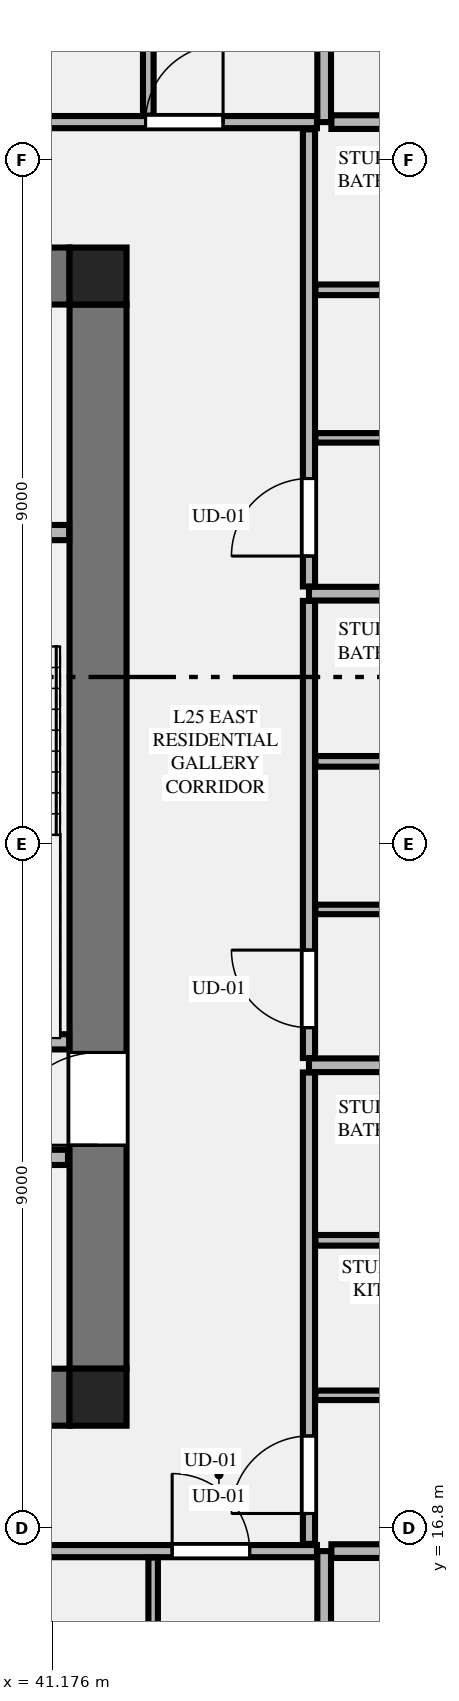
"""IFC4 building model, lengths in metres.
Left out: names, types, materials, properties, quantities, classifications, styles, units other than length and angle.
Written with IfcOpenShell. Run it as: python <this file> out.ifc"""

import sys

from ifc_helpers import new_model, si_unit, direction, frame, frame_2d, origin, origin_2d, place, context, subcontext, project, spatial, rectangle, extrude, element, fill, save


model = new_model("IFC4")
c1 = context("Model", 3, precision=1e-05, world=origin(), true_north=direction((0.0, 1.0)))
c2 = subcontext(c1, "Body", "Model", "MODEL_VIEW")
j1 = project(units=[si_unit("LENGTHUNIT", "METRE"), si_unit("PLANEANGLEUNIT", "RADIAN")], contexts=[c1])
p1 = place(None, origin())
s1 = spatial("IfcSite", under=j1, at=p1, CompositionType="ELEMENT")
p2 = place(p1, origin())
s2 = spatial("IfcBuilding", under=s1, at=p2, CompositionType="ELEMENT")
p3 = place(p2, frame((0.0, 0.0, 98.4)))
s3 = spatial("IfcBuildingStorey", under=s2, at=p3, CompositionType="ELEMENT", Elevation=98.4)
for number, where, z_axis, x_axis in (
    (1, (41.775, 18.525, 0.0), (0.0, 0.0, 1.0), (1.0, 0.0, 0.0)),
    (2, (41.775, 33.275, 0.0), (0.0, 0.0, 1.0), (1.0, 0.0, 0.0)),
):
    element("IfcColumn", number, at=place(p3, frame(where, z_axis=z_axis, x_axis=x_axis)), inside=s3, PredefinedType="COLUMN", context=c2, shape_type="SweptSolid", body=[
        extrude(rectangle(XDim=0.75, YDim=0.75, at=origin_2d()), origin(), (0.0, 0.0, 1.0), 3.55),
    ])
for number, where, z_axis, x_axis in (
    (3, (23.4, 18.525, 0.0), (0.0, 0.0, 1.0), (1.0, 0.0, 0.0)),
    (4, (23.4, 33.275, 0.0), (0.0, 0.0, 1.0), (1.0, 0.0, 0.0)),
):
    element("IfcWall", number, at=place(p3, frame(where, z_axis=z_axis, x_axis=x_axis)), inside=s3, PredefinedType="SHEAR", context=c2, shape_type="SweptSolid", body=[
        extrude(rectangle(XDim=18.0, YDim=0.75, at=frame_2d((9.0, 0.0))), origin(), (0.0, 0.0, 1.0), 3.34),
    ])
p4 = place(p3, frame((41.775, 18.9, 0.0), z_axis=(0.0, 0.0, 1.0), x_axis=(0.0, 1.0, 0.0)))
e5 = element("IfcWall", 5, at=p4, inside=s3, PredefinedType="SHEAR", context=c2, shape_type="SweptSolid", body=[
    extrude(rectangle(XDim=14.0, YDim=0.75, at=frame_2d((7.0, 0.0))), origin(), (0.0, 0.0, 1.0), 3.34),
])
p5 = place(p4, frame((2.94, 0.0, 0.0)))
e6 = element("IfcOpeningElement", 6, at=p5, cuts=e5, PredefinedType="OPENING", context=c2, shape_type="SweptSolid", body=[
    extrude(rectangle(XDim=1.22, YDim=2.25, at=frame_2d((0.61, 1.125))), frame((0.0, 0.385, 0.0), z_axis=(0.0, -1.0, 0.0), x_axis=(1.0, 0.0, 0.0)), (0.0, 0.0, 1.0), 0.77),
])
p6 = place(p3, frame((38.125, 23.2, 0.0), z_axis=(0.0, 0.0, 1.0), x_axis=(1.0, 0.0, 0.0)))
e7 = element("IfcWall", 7, at=p6, inside=s3, PredefinedType="PLUMBINGWALL", context=c2, shape_type="SweptSolid", body=[
    extrude(rectangle(XDim=3.27, YDim=0.2, at=frame_2d((1.635, 0.0))), origin(), (0.0, 0.0, 1.0), 3.34),
])
p7 = place(p3, frame((38.125, 29.9, 0.0), z_axis=(0.0, 0.0, 1.0), x_axis=(1.0, 0.0, 0.0)))
e8 = element("IfcWall", 8, at=p7, inside=s3, PredefinedType="PLUMBINGWALL", context=c2, shape_type="SweptSolid", body=[
    extrude(rectangle(XDim=3.27, YDim=0.2, at=frame_2d((1.635, 0.0))), origin(), (0.0, 0.0, 1.0), 3.34),
])
p8 = place(p7, frame((0.5, 0.0, 0.0)))
e9 = element("IfcOpeningElement", 9, at=p8, cuts=e8, PredefinedType="OPENING", context=c2, shape_type="SweptSolid", body=[
    extrude(rectangle(XDim=0.85, YDim=2.05, at=frame_2d((0.425, 1.025))), frame((0.0, 0.11, 0.0), z_axis=(0.0, -1.0, 0.0), x_axis=(1.0, 0.0, 0.0)), (0.0, 0.0, 1.0), 0.22),
])
p9 = place(p3, frame((23.42, 21.68, 0.0), z_axis=(0.0, 0.0, 1.0), x_axis=(1.0, 0.0, 0.0)))
e10 = element("IfcWall", 10, at=p9, inside=s3, PredefinedType="PLUMBINGWALL", context=c2, shape_type="SweptSolid", body=[
    extrude(rectangle(XDim=17.96, YDim=0.2, at=frame_2d((8.98, 0.0))), origin(), (0.0, 0.0, 1.0), 3.34),
])
p10 = place(p9, frame((11.6, 0.0, 0.0)))
e11 = element("IfcOpeningElement", 11, at=p10, cuts=e10, PredefinedType="OPENING", context=c2, shape_type="SweptSolid", body=[
    extrude(rectangle(XDim=1.1, YDim=2.2, at=frame_2d((0.55, 1.1))), frame((0.0, 0.11, 0.0), z_axis=(0.0, -1.0, 0.0), x_axis=(1.0, 0.0, 0.0)), (0.0, 0.0, 1.0), 0.22),
])
p11 = place(p9, frame((1.2, 0.0, 0.0)))
e12 = element("IfcOpeningElement", 12, at=p11, cuts=e10, PredefinedType="OPENING", context=c2, shape_type="SweptSolid", body=[
    extrude(rectangle(XDim=0.85, YDim=2.05, at=frame_2d((0.425, 1.025))), frame((0.0, 0.11, 0.0), z_axis=(0.0, -1.0, 0.0), x_axis=(1.0, 0.0, 0.0)), (0.0, 0.0, 1.0), 0.22),
])
p12 = place(p9, frame((13.55, 0.0, 0.0)))
e13 = element("IfcOpeningElement", 13, at=p12, cuts=e10, PredefinedType="OPENING", context=c2, shape_type="SweptSolid", body=[
    extrude(rectangle(XDim=0.85, YDim=2.05, at=frame_2d((0.425, 1.025))), frame((0.0, 0.11, 0.0), z_axis=(0.0, -1.0, 0.0), x_axis=(1.0, 0.0, 0.0)), (0.0, 0.0, 1.0), 0.22),
])
p13 = place(p9, frame((15.85, 0.0, 0.0)))
e14 = element("IfcOpeningElement", 14, at=p13, cuts=e10, PredefinedType="OPENING", context=c2, shape_type="SweptSolid", body=[
    extrude(rectangle(XDim=0.85, YDim=2.05, at=frame_2d((0.425, 1.025))), frame((0.0, 0.11, 0.0), z_axis=(0.0, -1.0, 0.0), x_axis=(1.0, 0.0, 0.0)), (0.0, 0.0, 1.0), 0.22),
])
p14 = place(p3, frame((44.75, 4.105, 0.0), z_axis=(0.0, 0.0, 1.0), x_axis=(0.0, 1.0, 0.0)))
e15 = element("IfcWall", 15, at=p14, inside=s3, PredefinedType="PARTITIONING", context=c2, shape_type="SweptSolid", body=[
    extrude(rectangle(XDim=12.395, YDim=0.18, at=frame_2d((6.198, 0.0))), origin(), (0.0, 0.0, 1.0), 3.34),
])
p15 = place(p3, frame((28.663, 16.5, 0.0), z_axis=(0.0, 0.0, 1.0), x_axis=(1.0, 0.0, 0.0)))
e16 = element("IfcWall", 16, at=p15, inside=s3, PredefinedType="PARTITIONING", context=c2, shape_type="SweptSolid", body=[
    extrude(rectangle(XDim=15.992, YDim=0.16, at=frame_2d((7.996, 0.0))), origin(), (0.0, 0.0, 1.0), 3.34),
])
p16 = place(p15, frame((14.087, 0.0, 0.0)))
e17 = element("IfcOpeningElement", 17, at=p16, cuts=e16, PredefinedType="OPENING", context=c2, shape_type="SweptSolid", body=[
    extrude(rectangle(XDim=1.02, YDim=2.25, at=frame_2d((0.51, 1.125))), frame((0.0, 0.09, 0.0), z_axis=(0.0, -1.0, 0.0), x_axis=(1.0, 0.0, 0.0)), (0.0, 0.0, 1.0), 0.18),
])
p17 = place(p3, frame((42.5, 13.01, 0.0), z_axis=(0.0, 0.0, 1.0), x_axis=(0.0, 1.0, 0.0)))
e18 = element("IfcWall", 18, at=p17, inside=s3, PredefinedType="PARTITIONING", context=c2, shape_type="SweptSolid", body=[
    extrude(rectangle(XDim=3.405, YDim=0.125, at=frame_2d((1.703, 0.0))), origin(), (0.0, 0.0, 1.0), 2.722),
])
p18 = place(p3, frame((44.75, 35.3, 0.0), z_axis=(0.0, 0.0, 1.0), x_axis=(0.0, 1.0, 0.0)))
e19 = element("IfcWall", 19, at=p18, inside=s3, PredefinedType="PARTITIONING", context=c2, shape_type="SweptSolid", body=[
    extrude(rectangle(XDim=12.195, YDim=0.18, at=frame_2d((6.098, 0.0))), origin(), (0.0, 0.0, 1.0), 3.34),
])
p19 = place(p3, frame((36.327, 35.3, 0.0), z_axis=(0.0, 0.0, 1.0), x_axis=(1.0, 0.0, 0.0)))
e20 = element("IfcWall", 20, at=p19, inside=s3, PredefinedType="PARTITIONING", context=c2, shape_type="SweptSolid", body=[
    extrude(rectangle(XDim=8.328, YDim=0.16, at=frame_2d((4.164, 0.0))), origin(), (0.0, 0.0, 1.0), 3.34),
])
p20 = place(p19, frame((6.073, 0.0, 0.0)))
e21 = element("IfcOpeningElement", 21, at=p20, cuts=e20, PredefinedType="OPENING", context=c2, shape_type="SweptSolid", body=[
    extrude(rectangle(XDim=1.02, YDim=2.25, at=frame_2d((0.51, 1.125))), frame((0.0, 0.09, 0.0), z_axis=(0.0, -1.0, 0.0), x_axis=(1.0, 0.0, 0.0)), (0.0, 0.0, 1.0), 0.18),
])
p21 = place(p3, frame((42.436, 35.385, 0.0), z_axis=(0.0, 0.0, 1.0), x_axis=(0.0, 1.0, 0.0)))
e22 = element("IfcWall", 22, at=p21, inside=s3, PredefinedType="PLUMBINGWALL", context=c2, shape_type="SweptSolid", body=[
    extrude(rectangle(XDim=3.59, YDim=0.14, at=frame_2d((1.795, 0.0))), origin(), (0.0, 0.0, 1.0), 2.722),
])
p22 = place(p3, frame((44.845, 16.5, 0.0), z_axis=(0.0, 0.0, 1.0), x_axis=(1.0, 0.0, 0.0)))
e23 = element("IfcWall", 23, at=p22, inside=s3, PredefinedType="PARTITIONING", context=c2, shape_type="SweptSolid", body=[
    extrude(rectangle(XDim=7.77, YDim=0.18, at=frame_2d((3.885, 0.0))), origin(), (0.0, 0.0, 1.0), 3.34),
])
p23 = place(p3, frame((44.845, 35.3, 0.0), z_axis=(0.0, 0.0, 1.0), x_axis=(1.0, 0.0, 0.0)))
e24 = element("IfcWall", 24, at=p23, inside=s3, PredefinedType="PARTITIONING", context=c2, shape_type="SweptSolid", body=[
    extrude(rectangle(XDim=7.669, YDim=0.18, at=frame_2d((3.834, 0.0))), origin(), (0.0, 0.0, 1.0), 3.34),
])
p24 = place(p3, frame((44.55, 16.595, 0.0), z_axis=(0.0, 0.0, 1.0), x_axis=(0.0, 1.0, 0.0)))
e25 = element("IfcWall", 25, at=p24, inside=s3, PredefinedType="PARTITIONING", context=c2, shape_type="SweptSolid", body=[
    extrude(rectangle(XDim=6.202, YDim=0.16, at=frame_2d((3.101, 0.0))), origin(), (0.0, 0.0, 1.0), 3.34),
])
p25 = place(p24, frame((0.4, 0.0, 0.0)))
e26 = element("IfcOpeningElement", 26, at=p25, cuts=e25, PredefinedType="OPENING", context=c2, shape_type="SweptSolid", body=[
    extrude(rectangle(XDim=1.02, YDim=2.25, at=frame_2d((0.51, 1.125))), frame((0.0, 0.09, 0.0), z_axis=(0.0, -1.0, 0.0), x_axis=(1.0, 0.0, 0.0)), (0.0, 0.0, 1.0), 0.18),
])
p26 = place(p3, frame((44.635, 18.55, 0.0), z_axis=(0.0, 0.0, 1.0), x_axis=(1.0, 0.0, 0.0)))
e27 = element("IfcWall", 27, at=p26, inside=s3, PredefinedType="PARTITIONING", context=c2, shape_type="SweptSolid", body=[
    extrude(rectangle(XDim=2.38, YDim=0.125, at=frame_2d((1.19, 0.0))), origin(), (0.0, 0.0, 1.0), 2.722),
])
p27 = place(p3, frame((44.635, 20.589, 0.0), z_axis=(0.0, 0.0, 1.0), x_axis=(1.0, 0.0, 0.0)))
e28 = element("IfcWall", 28, at=p27, inside=s3, PredefinedType="PLUMBINGWALL", context=c2, shape_type="SweptSolid", body=[
    extrude(rectangle(XDim=2.38, YDim=0.14, at=frame_2d((1.19, 0.0))), origin(), (0.0, 0.0, 1.0), 3.34),
])
p28 = place(p3, frame((44.55, 22.892, 0.0), z_axis=(0.0, 0.0, 1.0), x_axis=(1.0, 0.0, 0.0)))
e29 = element("IfcWall", 29, at=p28, inside=s3, PredefinedType="PARTITIONING", context=c2, shape_type="SweptSolid", body=[
    extrude(rectangle(XDim=11.299, YDim=0.18, at=frame_2d((5.649, 0.0))), origin(), (0.0, 0.0, 1.0), 3.34),
])
p29 = place(p3, frame((44.55, 22.987, 0.0), z_axis=(0.0, 0.0, 1.0), x_axis=(0.0, 1.0, 0.0)))
e30 = element("IfcWall", 30, at=p29, inside=s3, PredefinedType="PARTITIONING", context=c2, shape_type="SweptSolid", body=[
    extrude(rectangle(XDim=6.014, YDim=0.16, at=frame_2d((3.007, 0.0))), origin(), (0.0, 0.0, 1.0), 3.34),
])
p30 = place(p29, frame((0.4, 0.0, 0.0)))
e31 = element("IfcOpeningElement", 31, at=p30, cuts=e30, PredefinedType="OPENING", context=c2, shape_type="SweptSolid", body=[
    extrude(rectangle(XDim=1.02, YDim=2.25, at=frame_2d((0.51, 1.125))), frame((0.0, 0.09, 0.0), z_axis=(0.0, -1.0, 0.0), x_axis=(1.0, 0.0, 0.0)), (0.0, 0.0, 1.0), 0.18),
])
p31 = place(p3, frame((44.635, 24.942, 0.0), z_axis=(0.0, 0.0, 1.0), x_axis=(1.0, 0.0, 0.0)))
e32 = element("IfcWall", 32, at=p31, inside=s3, PredefinedType="PARTITIONING", context=c2, shape_type="SweptSolid", body=[
    extrude(rectangle(XDim=2.38, YDim=0.125, at=frame_2d((1.19, 0.0))), origin(), (0.0, 0.0, 1.0), 3.34),
])
p32 = place(p3, frame((44.635, 26.89, 0.0), z_axis=(0.0, 0.0, 1.0), x_axis=(1.0, 0.0, 0.0)))
e33 = element("IfcWall", 33, at=p32, inside=s3, PredefinedType="PLUMBINGWALL", context=c2, shape_type="SweptSolid", body=[
    extrude(rectangle(XDim=2.38, YDim=0.14, at=frame_2d((1.19, 0.0))), origin(), (0.0, 0.0, 1.0), 3.34),
])
p33 = place(p3, frame((44.55, 29.096, 0.0), z_axis=(0.0, 0.0, 1.0), x_axis=(1.0, 0.0, 0.0)))
e34 = element("IfcWall", 34, at=p33, inside=s3, PredefinedType="PARTITIONING", context=c2, shape_type="SweptSolid", body=[
    extrude(rectangle(XDim=11.103, YDim=0.18, at=frame_2d((5.552, 0.0))), origin(), (0.0, 0.0, 1.0), 3.34),
])
p34 = place(p3, frame((44.55, 29.191, 0.0), z_axis=(0.0, 0.0, 1.0), x_axis=(0.0, 1.0, 0.0)))
e35 = element("IfcWall", 35, at=p34, inside=s3, PredefinedType="PARTITIONING", context=c2, shape_type="SweptSolid", body=[
    extrude(rectangle(XDim=6.014, YDim=0.16, at=frame_2d((3.007, 0.0))), origin(), (0.0, 0.0, 1.0), 3.34),
])
p35 = place(p34, frame((0.4, 0.0, 0.0)))
e36 = element("IfcOpeningElement", 36, at=p35, cuts=e35, PredefinedType="OPENING", context=c2, shape_type="SweptSolid", body=[
    extrude(rectangle(XDim=1.02, YDim=2.25, at=frame_2d((0.51, 1.125))), frame((0.0, 0.09, 0.0), z_axis=(0.0, -1.0, 0.0), x_axis=(1.0, 0.0, 0.0)), (0.0, 0.0, 1.0), 0.18),
])
p36 = place(p3, frame((44.635, 31.146, 0.0), z_axis=(0.0, 0.0, 1.0), x_axis=(1.0, 0.0, 0.0)))
e37 = element("IfcWall", 37, at=p36, inside=s3, PredefinedType="PARTITIONING", context=c2, shape_type="SweptSolid", body=[
    extrude(rectangle(XDim=2.38, YDim=0.125, at=frame_2d((1.19, 0.0))), origin(), (0.0, 0.0, 1.0), 3.34),
])
p37 = place(p3, frame((44.635, 33.094, 0.0), z_axis=(0.0, 0.0, 1.0), x_axis=(1.0, 0.0, 0.0)))
e38 = element("IfcWall", 38, at=p37, inside=s3, PredefinedType="PLUMBINGWALL", context=c2, shape_type="SweptSolid", body=[
    extrude(rectangle(XDim=2.38, YDim=0.14, at=frame_2d((1.19, 0.0))), origin(), (0.0, 0.0, 1.0), 3.34),
])
p38 = place(p5, origin())
e39 = element("IfcDoor", 39, at=p38, inside=s3, OperationType="SINGLE_SWING_LEFT", PredefinedType="DOOR", context=c2, shape_type="SweptSolid", body=[
    extrude(rectangle(XDim=1.22, YDim=2.25, at=frame_2d((0.61, 1.125))), frame((0.0, 0.025, 0.0), z_axis=(0.0, -1.0, 0.0), x_axis=(1.0, 0.0, 0.0)), (0.0, 0.0, 1.0), 0.05),
])
fill(e6, e39)
p39 = place(p16, origin())
e40 = element("IfcDoor", 40, at=p39, inside=s3, OperationType="SINGLE_SWING_LEFT", PredefinedType="DOOR", context=c2, shape_type="SweptSolid", body=[
    extrude(rectangle(XDim=1.02, YDim=2.25, at=frame_2d((0.51, 1.125))), frame((0.0, 0.025, 0.0), z_axis=(0.0, -1.0, 0.0), x_axis=(1.0, 0.0, 0.0)), (0.0, 0.0, 1.0), 0.05),
])
fill(e17, e40)
p40 = place(p20, origin())
e41 = element("IfcDoor", 41, at=p40, inside=s3, OperationType="SINGLE_SWING_RIGHT", PredefinedType="DOOR", context=c2, shape_type="SweptSolid", body=[
    extrude(rectangle(XDim=1.02, YDim=2.25, at=frame_2d((0.51, 1.125))), frame((0.0, 0.025, 0.0), z_axis=(0.0, -1.0, 0.0), x_axis=(1.0, 0.0, 0.0)), (0.0, 0.0, 1.0), 0.05),
])
fill(e21, e41)
p41 = place(p25, origin())
e42 = element("IfcDoor", 42, at=p41, inside=s3, OperationType="SINGLE_SWING_LEFT", PredefinedType="DOOR", context=c2, shape_type="SweptSolid", body=[
    extrude(rectangle(XDim=1.02, YDim=2.25, at=frame_2d((0.51, 1.125))), frame((0.0, 0.025, 0.0), z_axis=(0.0, -1.0, 0.0), x_axis=(1.0, 0.0, 0.0)), (0.0, 0.0, 1.0), 0.05),
])
fill(e26, e42)
p42 = place(p30, origin())
e43 = element("IfcDoor", 43, at=p42, inside=s3, OperationType="SINGLE_SWING_RIGHT", PredefinedType="DOOR", context=c2, shape_type="SweptSolid", body=[
    extrude(rectangle(XDim=1.02, YDim=2.25, at=frame_2d((0.51, 1.125))), frame((0.0, 0.025, 0.0), z_axis=(0.0, -1.0, 0.0), x_axis=(1.0, 0.0, 0.0)), (0.0, 0.0, 1.0), 0.05),
])
fill(e31, e43)
p43 = place(p35, origin())
e44 = element("IfcDoor", 44, at=p43, inside=s3, OperationType="SINGLE_SWING_LEFT", PredefinedType="DOOR", context=c2, shape_type="SweptSolid", body=[
    extrude(rectangle(XDim=1.02, YDim=2.25, at=frame_2d((0.51, 1.125))), frame((0.0, 0.025, 0.0), z_axis=(0.0, -1.0, 0.0), x_axis=(1.0, 0.0, 0.0)), (0.0, 0.0, 1.0), 0.05),
])
fill(e36, e44)
save(model, sys.argv[1])
